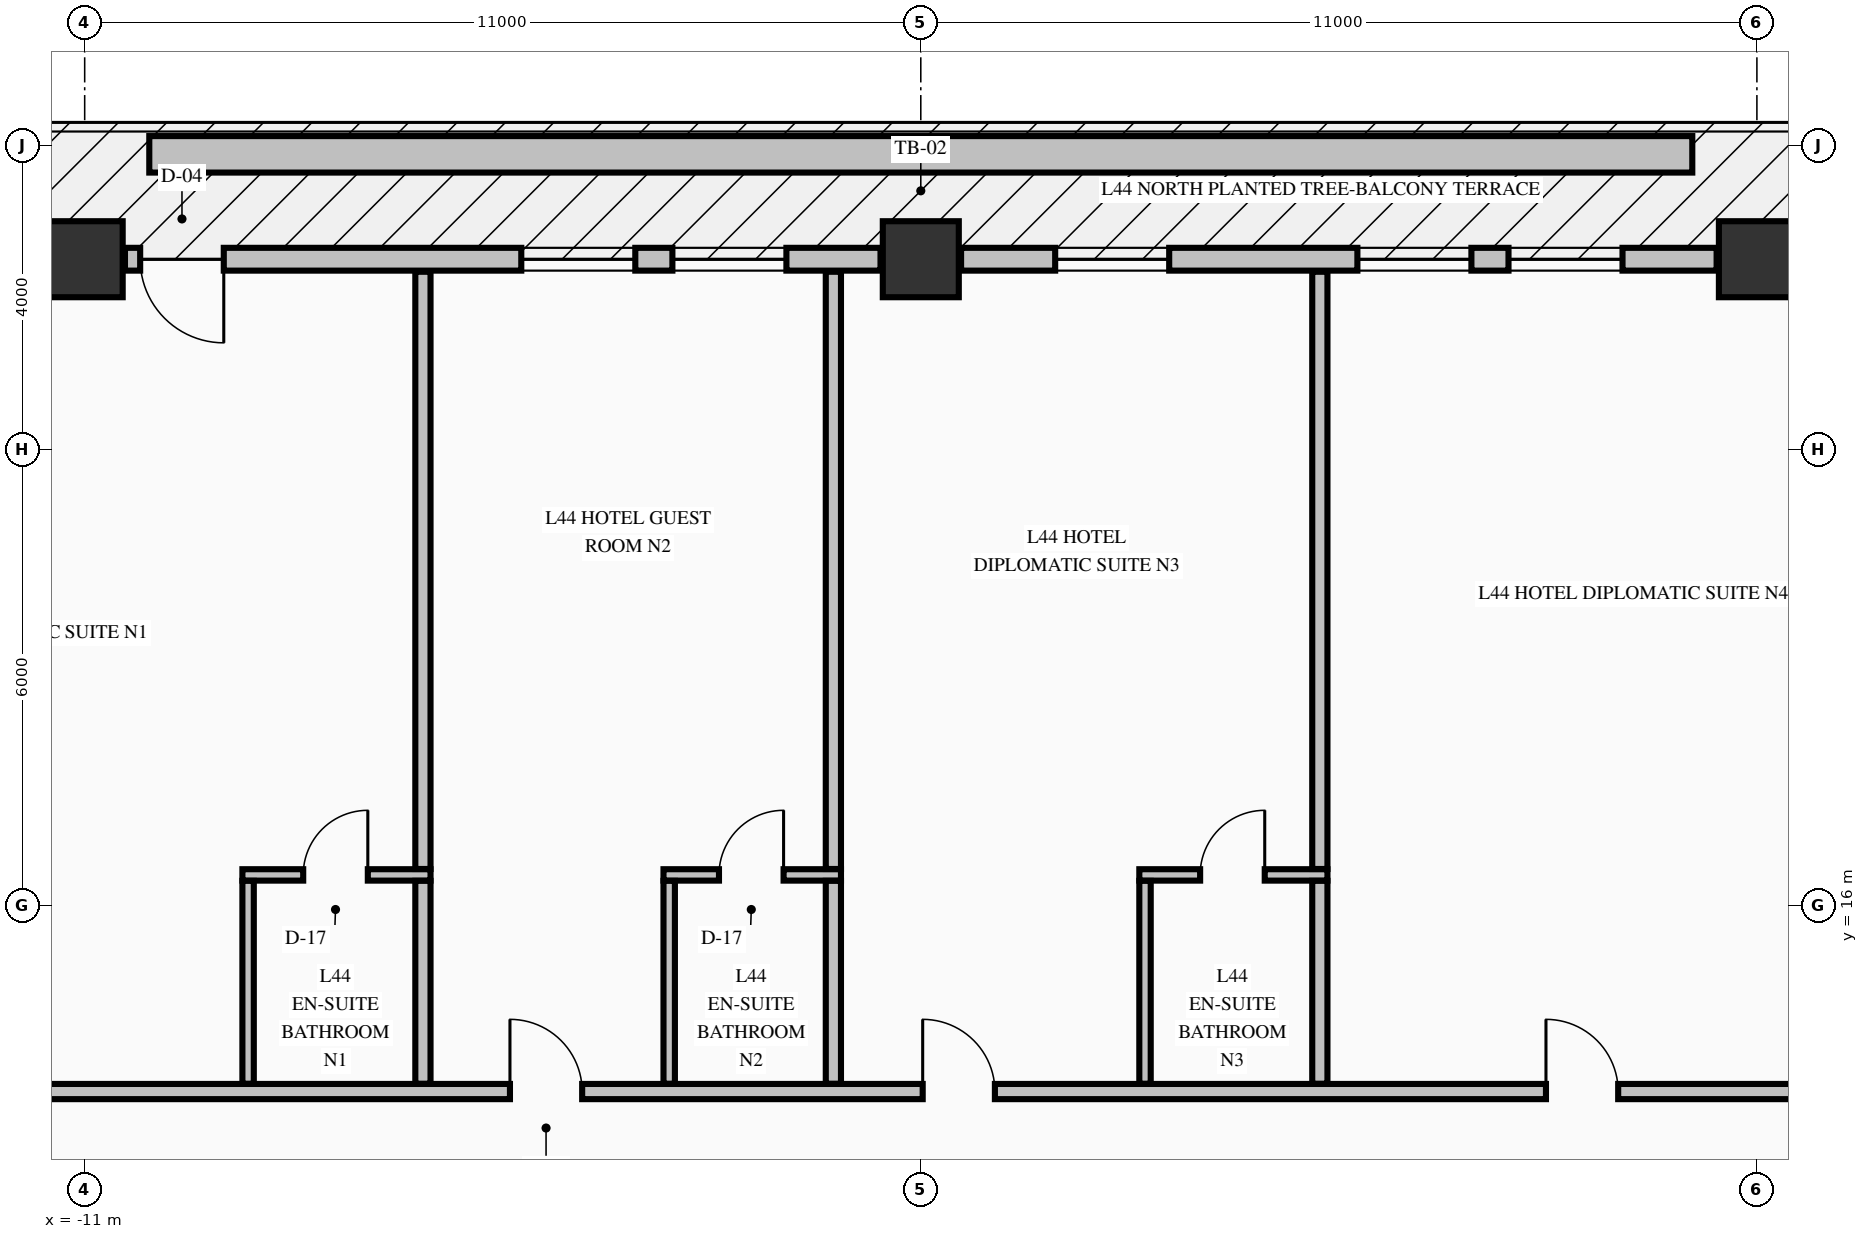
"""IFC4 building model, lengths in metres.
Left out: names, types, materials, properties, quantities, classifications, styles, units other than length and angle.
Written with IfcOpenShell. Run it as: python <this file> out.ifc"""

import sys

from ifc_helpers import new_model, si_unit, direction, frame, frame_2d, origin, origin_2d, place, context, subcontext, project, spatial, rectangle, extrude, element, fill, save


model = new_model("IFC4")
c1 = context("Model", 3, precision=1e-05, world=origin(), true_north=direction((0.0, 1.0)))
c2 = subcontext(c1, "Body", "Model", "MODEL_VIEW")
j1 = project(units=[si_unit("LENGTHUNIT", "METRE"), si_unit("PLANEANGLEUNIT", "RADIAN")], contexts=[c1])
p1 = place(None, origin())
s1 = spatial("IfcSite", under=j1, at=p1, CompositionType="ELEMENT")
p2 = place(p1, origin())
s2 = spatial("IfcBuilding", under=s1, at=p2, CompositionType="ELEMENT")
p3 = place(p2, frame((0.0, 0.0, 172.86)))
s3 = spatial("IfcBuildingStorey", under=s2, at=p3, CompositionType="ELEMENT", Elevation=172.86)
for number, where, z_axis, x_axis in (
    (1, (-11.0, 24.5, -0.25), (0.0, 0.0, 1.0), (1.0, 0.0, 0.0)),
    (2, (0.0, 24.5, -0.25), (0.0, 0.0, 1.0), (1.0, 0.0, 0.0)),
    (3, (11.0, 24.5, -0.25), (0.0, 0.0, 1.0), (1.0, 0.0, 0.0)),
):
    element("IfcColumn", number, at=place(p3, frame(where, z_axis=z_axis, x_axis=x_axis)), inside=s3, PredefinedType="COLUMN", context=c2, shape_type="SweptSolid", body=[
        extrude(rectangle(XDim=1.0, YDim=1.0, at=origin_2d()), origin(), (0.0, 0.0, 1.0), 3.375),
    ])
p4 = place(p3, frame((-0.53, 24.5, 0.0), z_axis=(0.0, 0.0, 1.0), x_axis=(-1.0, 0.0, 0.0)))
e4 = element("IfcWall", 4, at=p4, inside=s3, PredefinedType="STANDARD", context=c2, shape_type="SweptSolid", body=[
    extrude(rectangle(XDim=9.94, YDim=0.3, at=frame_2d((4.97, 0.0))), origin(), (0.0, 0.0, 1.0), 2.517),
])
p5 = place(p4, frame((8.64, 0.0, 0.0)))
e5 = element("IfcOpeningElement", 5, at=p5, cuts=e4, PredefinedType="OPENING", context=c2, shape_type="SweptSolid", body=[
    extrude(rectangle(XDim=1.1, YDim=2.15, at=frame_2d((0.55, 1.075))), frame((0.0, 0.16, 0.0), z_axis=(0.0, -1.0, 0.0), x_axis=(1.0, 0.0, 0.0)), (0.0, 0.0, 1.0), 0.32),
])
p6 = place(p4, frame((1.238, 0.0, 0.72)))
e6 = element("IfcOpeningElement", 6, at=p6, cuts=e4, PredefinedType="OPENING", context=c2, shape_type="SweptSolid", body=[
    extrude(rectangle(XDim=1.5, YDim=1.6, at=frame_2d((0.75, 0.8))), frame((0.0, 0.16, 0.0), z_axis=(0.0, -1.0, 0.0), x_axis=(1.0, 0.0, 0.0)), (0.0, 0.0, 1.0), 0.32),
])
p7 = place(p4, frame((3.226, 0.0, 0.72)))
e7 = element("IfcOpeningElement", 7, at=p7, cuts=e4, PredefinedType="OPENING", context=c2, shape_type="SweptSolid", body=[
    extrude(rectangle(XDim=1.5, YDim=1.6, at=frame_2d((0.75, 0.8))), frame((0.0, 0.16, 0.0), z_axis=(0.0, -1.0, 0.0), x_axis=(1.0, 0.0, 0.0)), (0.0, 0.0, 1.0), 0.32),
])
p8 = place(p3, frame((10.47, 24.5, 0.0), z_axis=(0.0, 0.0, 1.0), x_axis=(-1.0, 0.0, 0.0)))
e8 = element("IfcWall", 8, at=p8, inside=s3, PredefinedType="STANDARD", context=c2, shape_type="SweptSolid", body=[
    extrude(rectangle(XDim=9.94, YDim=0.3, at=frame_2d((4.97, 0.0))), origin(), (0.0, 0.0, 1.0), 2.517),
])
p9 = place(p8, frame((1.238, 0.0, 0.72)))
e9 = element("IfcOpeningElement", 9, at=p9, cuts=e8, PredefinedType="OPENING", context=c2, shape_type="SweptSolid", body=[
    extrude(rectangle(XDim=1.5, YDim=1.6, at=frame_2d((0.75, 0.8))), frame((0.0, 0.16, 0.0), z_axis=(0.0, -1.0, 0.0), x_axis=(1.0, 0.0, 0.0)), (0.0, 0.0, 1.0), 0.32),
])
p10 = place(p8, frame((3.226, 0.0, 0.72)))
e10 = element("IfcOpeningElement", 10, at=p10, cuts=e8, PredefinedType="OPENING", context=c2, shape_type="SweptSolid", body=[
    extrude(rectangle(XDim=1.5, YDim=1.6, at=frame_2d((0.75, 0.8))), frame((0.0, 0.16, 0.0), z_axis=(0.0, -1.0, 0.0), x_axis=(1.0, 0.0, 0.0)), (0.0, 0.0, 1.0), 0.32),
])
p11 = place(p8, frame((7.202, 0.0, 0.72)))
e11 = element("IfcOpeningElement", 11, at=p11, cuts=e8, PredefinedType="OPENING", context=c2, shape_type="SweptSolid", body=[
    extrude(rectangle(XDim=1.5, YDim=1.6, at=frame_2d((0.75, 0.8))), frame((0.0, 0.16, 0.0), z_axis=(0.0, -1.0, 0.0), x_axis=(1.0, 0.0, 0.0)), (0.0, 0.0, 1.0), 0.32),
])
p12 = place(p3, frame((-17.1, 13.55, 0.0), z_axis=(0.0, 0.0, 1.0), x_axis=(1.0, 0.0, 0.0)))
e12 = element("IfcWall", 12, at=p12, inside=s3, PredefinedType="PARTITIONING", context=c2, shape_type="SweptSolid", body=[
    extrude(rectangle(XDim=39.2, YDim=0.2, at=frame_2d((19.6, 0.0))), origin(), (0.0, 0.0, 1.0), 3.125),
])
p13 = place(p12, frame((3.695, 0.0, 0.0)))
e13 = element("IfcOpeningElement", 13, at=p13, cuts=e12, PredefinedType="OPENING", context=c2, shape_type="SweptSolid", body=[
    extrude(rectangle(XDim=0.95, YDim=2.15, at=frame_2d((0.475, 1.075))), frame((0.0, 0.11, 0.0), z_axis=(0.0, -1.0, 0.0), x_axis=(1.0, 0.0, 0.0)), (0.0, 0.0, 1.0), 0.22),
])
p14 = place(p12, frame((11.695, 0.0, 0.0)))
e14 = element("IfcOpeningElement", 14, at=p14, cuts=e12, PredefinedType="OPENING", context=c2, shape_type="SweptSolid", body=[
    extrude(rectangle(XDim=0.95, YDim=2.15, at=frame_2d((0.475, 1.075))), frame((0.0, 0.11, 0.0), z_axis=(0.0, -1.0, 0.0), x_axis=(1.0, 0.0, 0.0)), (0.0, 0.0, 1.0), 0.22),
])
p15 = place(p12, frame((17.125, 0.0, 0.0)))
e15 = element("IfcOpeningElement", 15, at=p15, cuts=e12, PredefinedType="OPENING", context=c2, shape_type="SweptSolid", body=[
    extrude(rectangle(XDim=0.95, YDim=2.15, at=frame_2d((0.475, 1.075))), frame((0.0, 0.11, 0.0), z_axis=(0.0, -1.0, 0.0), x_axis=(1.0, 0.0, 0.0)), (0.0, 0.0, 1.0), 0.22),
])
p16 = place(p12, frame((25.325, 0.0, 0.0)))
e16 = element("IfcOpeningElement", 16, at=p16, cuts=e12, PredefinedType="OPENING", context=c2, shape_type="SweptSolid", body=[
    extrude(rectangle(XDim=0.95, YDim=2.15, at=frame_2d((0.475, 1.075))), frame((0.0, 0.11, 0.0), z_axis=(0.0, -1.0, 0.0), x_axis=(1.0, 0.0, 0.0)), (0.0, 0.0, 1.0), 0.22),
])
p17 = place(p12, frame((33.695, 0.0, 0.0)))
e17 = element("IfcOpeningElement", 17, at=p17, cuts=e12, PredefinedType="OPENING", context=c2, shape_type="SweptSolid", body=[
    extrude(rectangle(XDim=0.95, YDim=2.15, at=frame_2d((0.475, 1.075))), frame((0.0, 0.11, 0.0), z_axis=(0.0, -1.0, 0.0), x_axis=(1.0, 0.0, 0.0)), (0.0, 0.0, 1.0), 0.22),
])
p18 = place(p3, frame((-8.925, 16.4, 0.0), z_axis=(0.0, 0.0, 1.0), x_axis=(1.0, 0.0, 0.0)))
e18 = element("IfcWall", 18, at=p18, inside=s3, PredefinedType="PARTITIONING", context=c2, shape_type="SweptSolid", body=[
    extrude(rectangle(XDim=2.475, YDim=0.15, at=frame_2d((1.238, 0.0))), origin(), (0.0, 0.0, 1.0), 3.125),
])
p19 = place(p18, frame((0.8, 0.0, 0.0)))
e19 = element("IfcOpeningElement", 19, at=p19, cuts=e18, PredefinedType="OPENING", context=c2, shape_type="SweptSolid", body=[
    extrude(rectangle(XDim=0.85, YDim=2.1, at=frame_2d((0.425, 1.05))), frame((0.0, 0.085, 0.0), z_axis=(0.0, -1.0, 0.0), x_axis=(1.0, 0.0, 0.0)), (0.0, 0.0, 1.0), 0.17),
])
p20 = place(p3, frame((-3.385, 16.4, 0.0), z_axis=(0.0, 0.0, 1.0), x_axis=(1.0, 0.0, 0.0)))
e20 = element("IfcWall", 20, at=p20, inside=s3, PredefinedType="PARTITIONING", context=c2, shape_type="SweptSolid", body=[
    extrude(rectangle(XDim=2.335, YDim=0.15, at=frame_2d((1.167, 0.0))), origin(), (0.0, 0.0, 1.0), 3.125),
])
p21 = place(p20, frame((0.73, 0.0, 0.0)))
e21 = element("IfcOpeningElement", 21, at=p21, cuts=e20, PredefinedType="OPENING", context=c2, shape_type="SweptSolid", body=[
    extrude(rectangle(XDim=0.85, YDim=2.1, at=frame_2d((0.425, 1.05))), frame((0.0, 0.085, 0.0), z_axis=(0.0, -1.0, 0.0), x_axis=(1.0, 0.0, 0.0)), (0.0, 0.0, 1.0), 0.17),
])
p22 = place(p3, frame((2.875, 16.4, 0.0), z_axis=(0.0, 0.0, 1.0), x_axis=(1.0, 0.0, 0.0)))
e22 = element("IfcWall", 22, at=p22, inside=s3, PredefinedType="PARTITIONING", context=c2, shape_type="SweptSolid", body=[
    extrude(rectangle(XDim=2.475, YDim=0.15, at=frame_2d((1.238, 0.0))), origin(), (0.0, 0.0, 1.0), 3.125),
])
p23 = place(p22, frame((0.8, 0.0, 0.0)))
e23 = element("IfcOpeningElement", 23, at=p23, cuts=e22, PredefinedType="OPENING", context=c2, shape_type="SweptSolid", body=[
    extrude(rectangle(XDim=0.85, YDim=2.1, at=frame_2d((0.425, 1.05))), frame((0.0, 0.085, 0.0), z_axis=(0.0, -1.0, 0.0), x_axis=(1.0, 0.0, 0.0)), (0.0, 0.0, 1.0), 0.17),
])
p24 = place(p3, frame((-8.85, 13.653, 0.0), z_axis=(0.0, 0.0, 1.0), x_axis=(0.0, 1.0, 0.0)))
e24 = element("IfcWall", 24, at=p24, inside=s3, PredefinedType="PARTITIONING", context=c2, shape_type="SweptSolid", body=[
    extrude(rectangle(XDim=2.669, YDim=0.15, at=frame_2d((1.334, 0.0))), origin(), (0.0, 0.0, 1.0), 3.125),
])
p25 = place(p3, frame((-6.55, 13.653, 0.0), z_axis=(0.0, 0.0, 1.0), x_axis=(0.0, 1.0, 0.0)))
e25 = element("IfcWall", 25, at=p25, inside=s3, PredefinedType="PARTITIONING", context=c2, shape_type="SweptSolid", body=[
    extrude(rectangle(XDim=2.669, YDim=0.2, at=frame_2d((1.334, 0.0))), origin(), (0.0, 0.0, 1.0), 3.125),
])
p26 = place(p3, frame((-6.55, 16.478, 0.0), z_axis=(0.0, 0.0, 1.0), x_axis=(0.0, 1.0, 0.0)))
e26 = element("IfcWall", 26, at=p26, inside=s3, PredefinedType="PARTITIONING", context=c2, shape_type="SweptSolid", body=[
    extrude(rectangle(XDim=7.857, YDim=0.2, at=frame_2d((3.928, 0.0))), origin(), (0.0, 0.0, 1.0), 3.125),
])
p27 = place(p3, frame((-3.31, 13.653, 0.0), z_axis=(0.0, 0.0, 1.0), x_axis=(0.0, 1.0, 0.0)))
e27 = element("IfcWall", 27, at=p27, inside=s3, PredefinedType="PARTITIONING", context=c2, shape_type="SweptSolid", body=[
    extrude(rectangle(XDim=2.669, YDim=0.15, at=frame_2d((1.334, 0.0))), origin(), (0.0, 0.0, 1.0), 3.125),
])
p28 = place(p3, frame((-1.15, 13.653, 0.0), z_axis=(0.0, 0.0, 1.0), x_axis=(0.0, 1.0, 0.0)))
e28 = element("IfcWall", 28, at=p28, inside=s3, PredefinedType="PARTITIONING", context=c2, shape_type="SweptSolid", body=[
    extrude(rectangle(XDim=2.669, YDim=0.2, at=frame_2d((1.334, 0.0))), origin(), (0.0, 0.0, 1.0), 3.125),
])
p29 = place(p3, frame((-1.15, 16.478, 0.0), z_axis=(0.0, 0.0, 1.0), x_axis=(0.0, 1.0, 0.0)))
e29 = element("IfcWall", 29, at=p29, inside=s3, PredefinedType="PARTITIONING", context=c2, shape_type="SweptSolid", body=[
    extrude(rectangle(XDim=7.857, YDim=0.2, at=frame_2d((3.928, 0.0))), origin(), (0.0, 0.0, 1.0), 3.125),
])
p30 = place(p3, frame((2.95, 13.653, 0.0), z_axis=(0.0, 0.0, 1.0), x_axis=(0.0, 1.0, 0.0)))
e30 = element("IfcWall", 30, at=p30, inside=s3, PredefinedType="PARTITIONING", context=c2, shape_type="SweptSolid", body=[
    extrude(rectangle(XDim=2.669, YDim=0.15, at=frame_2d((1.334, 0.0))), origin(), (0.0, 0.0, 1.0), 3.125),
])
p31 = place(p3, frame((5.25, 13.653, 0.0), z_axis=(0.0, 0.0, 1.0), x_axis=(0.0, 1.0, 0.0)))
e31 = element("IfcWall", 31, at=p31, inside=s3, PredefinedType="PARTITIONING", context=c2, shape_type="SweptSolid", body=[
    extrude(rectangle(XDim=2.669, YDim=0.2, at=frame_2d((1.334, 0.0))), origin(), (0.0, 0.0, 1.0), 3.125),
])
p32 = place(p3, frame((5.25, 16.478, 0.0), z_axis=(0.0, 0.0, 1.0), x_axis=(0.0, 1.0, 0.0)))
e32 = element("IfcWall", 32, at=p32, inside=s3, PredefinedType="PARTITIONING", context=c2, shape_type="SweptSolid", body=[
    extrude(rectangle(XDim=7.857, YDim=0.2, at=frame_2d((3.928, 0.0))), origin(), (0.0, 0.0, 1.0), 3.125),
])
p33 = place(p3, frame((-10.15, 25.88, -0.04), z_axis=(0.0, 0.0, 1.0), x_axis=(1.0, 0.0, 0.0)))
e33 = element("IfcWall", 33, at=p33, inside=s3, PredefinedType="PARAPET", context=c2, shape_type="SweptSolid", body=[
    extrude(rectangle(XDim=20.3, YDim=0.48, at=frame_2d((10.15, 0.0))), origin(), (0.0, 0.0, 1.0), 0.52),
])
p34 = place(p5, origin())
e34 = element("IfcDoor", 34, at=p34, inside=s3, OperationType="SINGLE_SWING_LEFT", PredefinedType="DOOR", context=c2, shape_type="SweptSolid", body=[
    extrude(rectangle(XDim=1.1, YDim=2.15, at=frame_2d((0.55, 1.075))), frame((0.0, 0.025, 0.0), z_axis=(0.0, -1.0, 0.0), x_axis=(1.0, 0.0, 0.0)), (0.0, 0.0, 1.0), 0.05),
])
fill(e5, e34)
p35 = place(p6, origin())
e35 = element("IfcWindow", 35, at=p35, inside=s3, PartitioningType="SINGLE_PANEL", PredefinedType="WINDOW", context=c2, shape_type="SweptSolid", body=[
    extrude(rectangle(XDim=1.5, YDim=1.6, at=frame_2d((0.75, 0.8))), frame((0.0, 0.03, 0.0), z_axis=(0.0, -1.0, 0.0), x_axis=(1.0, 0.0, 0.0)), (0.0, 0.0, 1.0), 0.06),
])
fill(e6, e35)
p36 = place(p7, origin())
e36 = element("IfcWindow", 36, at=p36, inside=s3, PartitioningType="SINGLE_PANEL", PredefinedType="WINDOW", context=c2, shape_type="SweptSolid", body=[
    extrude(rectangle(XDim=1.5, YDim=1.6, at=frame_2d((0.75, 0.8))), frame((0.0, 0.03, 0.0), z_axis=(0.0, -1.0, 0.0), x_axis=(1.0, 0.0, 0.0)), (0.0, 0.0, 1.0), 0.06),
])
fill(e7, e36)
p37 = place(p9, origin())
e37 = element("IfcWindow", 37, at=p37, inside=s3, PartitioningType="SINGLE_PANEL", PredefinedType="WINDOW", context=c2, shape_type="SweptSolid", body=[
    extrude(rectangle(XDim=1.5, YDim=1.6, at=frame_2d((0.75, 0.8))), frame((0.0, 0.03, 0.0), z_axis=(0.0, -1.0, 0.0), x_axis=(1.0, 0.0, 0.0)), (0.0, 0.0, 1.0), 0.06),
])
fill(e9, e37)
p38 = place(p10, origin())
e38 = element("IfcWindow", 38, at=p38, inside=s3, PartitioningType="SINGLE_PANEL", PredefinedType="WINDOW", context=c2, shape_type="SweptSolid", body=[
    extrude(rectangle(XDim=1.5, YDim=1.6, at=frame_2d((0.75, 0.8))), frame((0.0, 0.03, 0.0), z_axis=(0.0, -1.0, 0.0), x_axis=(1.0, 0.0, 0.0)), (0.0, 0.0, 1.0), 0.06),
])
fill(e10, e38)
p39 = place(p11, origin())
e39 = element("IfcWindow", 39, at=p39, inside=s3, PartitioningType="SINGLE_PANEL", PredefinedType="WINDOW", context=c2, shape_type="SweptSolid", body=[
    extrude(rectangle(XDim=1.5, YDim=1.6, at=frame_2d((0.75, 0.8))), frame((0.0, 0.03, 0.0), z_axis=(0.0, -1.0, 0.0), x_axis=(1.0, 0.0, 0.0)), (0.0, 0.0, 1.0), 0.06),
])
fill(e11, e39)
p40 = place(p19, origin())
e40 = element("IfcDoor", 40, at=p40, inside=s3, OperationType="SINGLE_SWING_RIGHT", PredefinedType="DOOR", context=c2, shape_type="SweptSolid", body=[
    extrude(rectangle(XDim=0.85, YDim=2.1, at=frame_2d((0.425, 1.05))), frame((0.0, 0.025, 0.0), z_axis=(0.0, -1.0, 0.0), x_axis=(1.0, 0.0, 0.0)), (0.0, 0.0, 1.0), 0.05),
])
fill(e19, e40)
p41 = place(p14, origin())
e41 = element("IfcDoor", 41, at=p41, inside=s3, OperationType="SINGLE_SWING_LEFT", PredefinedType="DOOR", context=c2, shape_type="SweptSolid", body=[
    extrude(rectangle(XDim=0.95, YDim=2.15, at=frame_2d((0.475, 1.075))), frame((0.0, 0.025, 0.0), z_axis=(0.0, -1.0, 0.0), x_axis=(1.0, 0.0, 0.0)), (0.0, 0.0, 1.0), 0.05),
])
fill(e14, e41)
p42 = place(p21, origin())
e42 = element("IfcDoor", 42, at=p42, inside=s3, OperationType="SINGLE_SWING_RIGHT", PredefinedType="DOOR", context=c2, shape_type="SweptSolid", body=[
    extrude(rectangle(XDim=0.85, YDim=2.1, at=frame_2d((0.425, 1.05))), frame((0.0, 0.025, 0.0), z_axis=(0.0, -1.0, 0.0), x_axis=(1.0, 0.0, 0.0)), (0.0, 0.0, 1.0), 0.05),
])
fill(e21, e42)
p43 = place(p15, origin())
e43 = element("IfcDoor", 43, at=p43, inside=s3, OperationType="SINGLE_SWING_LEFT", PredefinedType="DOOR", context=c2, shape_type="SweptSolid", body=[
    extrude(rectangle(XDim=0.95, YDim=2.15, at=frame_2d((0.475, 1.075))), frame((0.0, 0.025, 0.0), z_axis=(0.0, -1.0, 0.0), x_axis=(1.0, 0.0, 0.0)), (0.0, 0.0, 1.0), 0.05),
])
fill(e15, e43)
p44 = place(p23, origin())
e44 = element("IfcDoor", 44, at=p44, inside=s3, OperationType="SINGLE_SWING_RIGHT", PredefinedType="DOOR", context=c2, shape_type="SweptSolid", body=[
    extrude(rectangle(XDim=0.85, YDim=2.1, at=frame_2d((0.425, 1.05))), frame((0.0, 0.025, 0.0), z_axis=(0.0, -1.0, 0.0), x_axis=(1.0, 0.0, 0.0)), (0.0, 0.0, 1.0), 0.05),
])
fill(e23, e44)
p45 = place(p16, origin())
e45 = element("IfcDoor", 45, at=p45, inside=s3, OperationType="SINGLE_SWING_LEFT", PredefinedType="DOOR", context=c2, shape_type="SweptSolid", body=[
    extrude(rectangle(XDim=0.95, YDim=2.15, at=frame_2d((0.475, 1.075))), frame((0.0, 0.025, 0.0), z_axis=(0.0, -1.0, 0.0), x_axis=(1.0, 0.0, 0.0)), (0.0, 0.0, 1.0), 0.05),
])
fill(e16, e45)
save(model, sys.argv[1])
